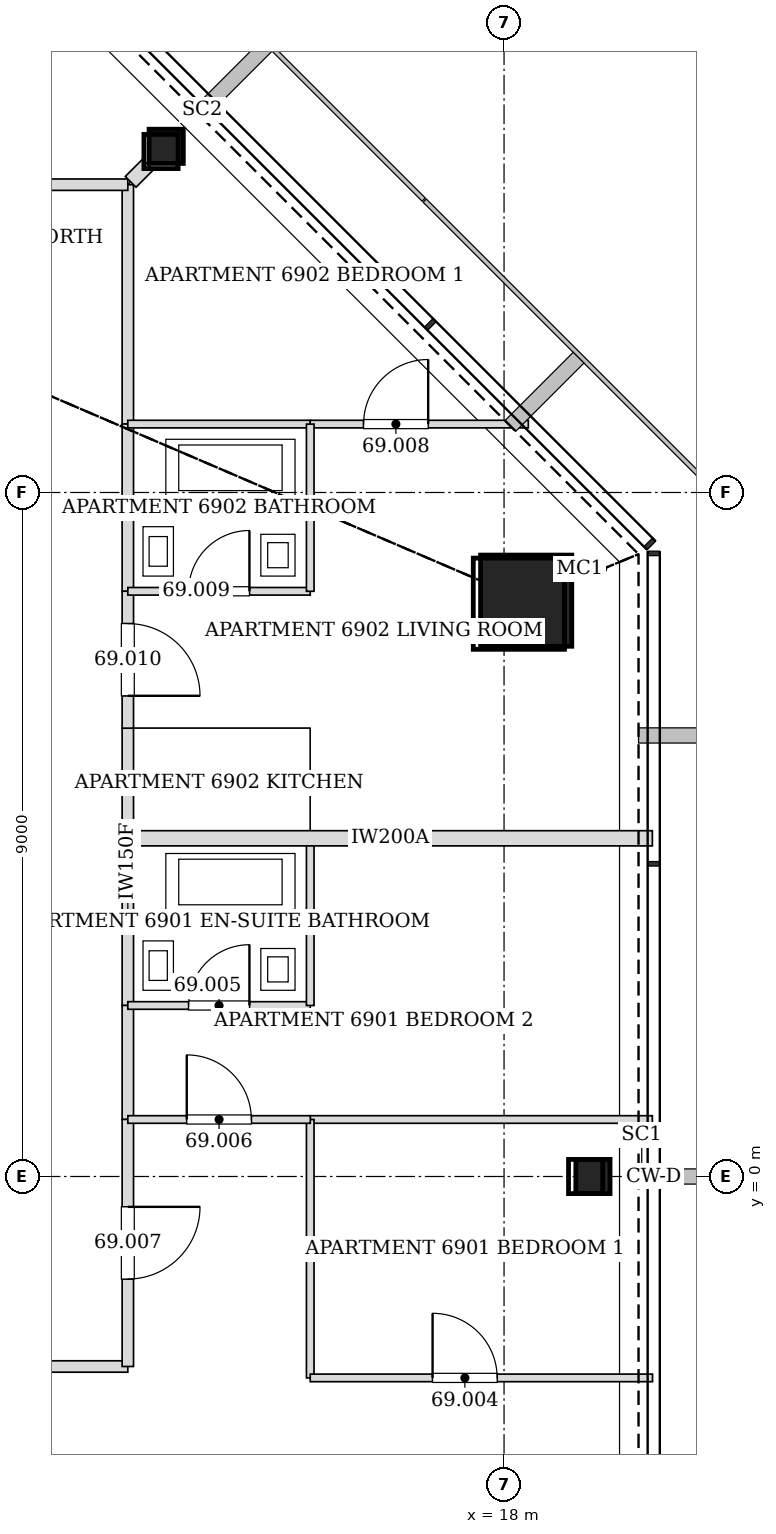
"""IFC4 building model, lengths in metres.
Left out: names, types, materials, properties, quantities, classifications, styles, units other than length and angle.
Written with IfcOpenShell. Run it as: python <this file> out.ifc"""

import sys

from ifc_helpers import new_model, si_unit, direction, frame, frame_2d, origin, origin_2d, place, context, subcontext, project, spatial, rectangle, hollow_rectangle, extrude, element, fill, save


model = new_model("IFC4")
c1 = context("Model", 3, precision=1e-05, world=origin(), true_north=direction((0.0, 1.0)))
c2 = subcontext(c1, "Body", "Model", "MODEL_VIEW")
j1 = project(units=[si_unit("LENGTHUNIT", "METRE"), si_unit("PLANEANGLEUNIT", "RADIAN")], contexts=[c1])
p1 = place(None, origin())
s1 = spatial("IfcSite", under=j1, at=p1, CompositionType="ELEMENT")
p2 = place(p1, origin())
s2 = spatial("IfcBuilding", under=s1, at=p2, CompositionType="ELEMENT")
p3 = place(p2, frame((0.0, 0.0, 284.4)))
s3 = spatial("IfcBuildingStorey", under=s2, at=p3, CompositionType="ELEMENT", Elevation=284.4)
p4 = place(p3, frame((18.291, 7.576, 0.0), z_axis=(-0.028277121884, -0.011698403216, 0.999531666202), x_axis=(0.382282742426, -0.924045401938, 0.0)))
e1 = element("IfcColumn", 1, at=p4, inside=s3, PredefinedType="COLUMN", context=c2, shape_type="SweptSolid", body=[
    extrude(hollow_rectangle(XDim=1.2, YDim=1.2, WallThickness=0.055, at=origin_2d()), origin(), (0.0, 0.0, 1.0), 3.402),
])
for number, where, z_axis, x_axis in (
    (2, (19.169, 0.0, 0.0), (-0.028, 0.0, 1.0), (0.0, -1.0, 0.0)),
    (3, (13.555, 13.555, 0.0), (-0.02, -0.02, 1.0), (0.707, -0.707, 0.0)),
):
    element("IfcColumn", number, at=place(p3, frame(where, z_axis=z_axis, x_axis=x_axis)), inside=s3, PredefinedType="COLUMN", context=c2, shape_type="SweptSolid", body=[
        extrude(hollow_rectangle(XDim=0.45, YDim=0.45, WallThickness=0.02, at=origin_2d()), origin(), (0.0, 0.0, 1.0), 3.402),
    ])
p5 = place(p3, frame((13.05, 2.249, 0.0), z_axis=(0.0, 0.0, 1.0), x_axis=(0.0, 1.0, 0.0)))
e4 = element("IfcWall", 4, at=p5, inside=s3, PredefinedType="PARTITIONING", context=c2, shape_type="SweptSolid", body=[
    extrude(rectangle(XDim=2.202, YDim=0.15, at=frame_2d((1.101, 0.0))), origin(), (0.0, 0.0, 1.0), 3.2),
])
p6 = place(p3, frame((13.05, 0.749, 0.0), z_axis=(0.0, 0.0, 1.0), x_axis=(0.0, 1.0, 0.0)))
e5 = element("IfcWall", 5, at=p6, inside=s3, PredefinedType="PARTITIONING", context=c2, shape_type="SweptSolid", body=[
    extrude(rectangle(XDim=1.502, YDim=0.15, at=frame_2d((0.751, 0.0))), origin(), (0.0, 0.0, 1.0), 3.2),
])
p7 = place(p3, frame((11.25, -2.5, 0.0), z_axis=(0.0, 0.0, 1.0), x_axis=(1.0, 0.0, 0.0)))
e6 = element("IfcWall", 6, at=p7, inside=s3, PredefinedType="PARTITIONING", context=c2, shape_type="SweptSolid", body=[
    extrude(rectangle(XDim=1.8, YDim=0.15, at=frame_2d((0.9, 0.0))), origin(), (0.0, 0.0, 1.0), 3.2),
])
p8 = place(p3, frame((13.05, -2.5, 0.0), z_axis=(0.0, 0.0, 1.0), x_axis=(0.0, 1.0, 0.0)))
e7 = element("IfcWall", 7, at=p8, inside=s3, PredefinedType="PARTITIONING", context=c2, shape_type="SweptSolid", body=[
    extrude(rectangle(XDim=3.251, YDim=0.15, at=frame_2d((1.625, 0.0))), origin(), (0.0, 0.0, 1.0), 2.349),
])
p9 = place(p8, frame((1.15, 0.0, 0.0)))
e8 = element("IfcOpeningElement", 8, at=p9, cuts=e7, PredefinedType="OPENING", context=c2, shape_type="SweptSolid", body=[
    extrude(rectangle(XDim=0.95, YDim=2.1, at=frame_2d((0.475, 1.05))), frame((0.0, 0.085, 0.0), z_axis=(0.0, -1.0, 0.0), x_axis=(1.0, 0.0, 0.0)), (0.0, 0.0, 1.0), 0.17),
])
p10 = place(p3, frame((13.05, 9.899, 0.0), z_axis=(0.0, 0.0, 1.0), x_axis=(0.0, 1.0, 0.0)))
e9 = element("IfcWall", 9, at=p10, inside=s3, PredefinedType="PARTITIONING", context=c2, shape_type="SweptSolid", body=[
    extrude(rectangle(XDim=3.151, YDim=0.15, at=frame_2d((1.576, 0.0))), origin(), (0.0, 0.0, 1.0), 2.497),
])
p11 = place(p3, frame((13.05, 7.699, 0.0), z_axis=(0.0, 0.0, 1.0), x_axis=(0.0, 1.0, 0.0)))
e10 = element("IfcWall", 10, at=p11, inside=s3, PredefinedType="PARTITIONING", context=c2, shape_type="SweptSolid", body=[
    extrude(rectangle(XDim=2.202, YDim=0.15, at=frame_2d((1.101, 0.0))), origin(), (0.0, 0.0, 1.0), 2.497),
])
p12 = place(p3, frame((13.05, 4.449, 0.0), z_axis=(0.0, 0.0, 1.0), x_axis=(0.0, 1.0, 0.0)))
e11 = element("IfcWall", 11, at=p12, inside=s3, PredefinedType="PARTITIONING", context=c2, shape_type="SweptSolid", body=[
    extrude(rectangle(XDim=1.452, YDim=0.15, at=frame_2d((0.726, 0.0))), origin(), (0.0, 0.0, 1.0), 3.2),
])
p13 = place(p3, frame((13.05, 5.899, 0.0), z_axis=(0.0, 0.0, 1.0), x_axis=(0.0, 1.0, 0.0)))
e12 = element("IfcWall", 12, at=p13, inside=s3, PredefinedType="PARTITIONING", context=c2, shape_type="SweptSolid", body=[
    extrude(rectangle(XDim=1.802, YDim=0.15, at=frame_2d((0.901, 0.0))), origin(), (0.0, 0.0, 1.0), 3.2),
])
p14 = place(p13, frame((0.426, 0.0, 0.0)))
e13 = element("IfcOpeningElement", 13, at=p14, cuts=e12, PredefinedType="OPENING", context=c2, shape_type="SweptSolid", body=[
    extrude(rectangle(XDim=0.95, YDim=2.1, at=frame_2d((0.475, 1.05))), frame((0.0, 0.085, 0.0), z_axis=(0.0, -1.0, 0.0), x_axis=(1.0, 0.0, 0.0)), (0.0, 0.0, 1.0), 0.17),
])
p15 = place(p3, frame((13.05, 13.05, 0.0), z_axis=(0.0, 0.0, 1.0), x_axis=(-1.0, 0.0, 0.0)))
e14 = element("IfcWall", 14, at=p15, inside=s3, PredefinedType="PARTITIONING", context=c2, shape_type="SweptSolid", body=[
    extrude(rectangle(XDim=4.101, YDim=0.15, at=frame_2d((2.051, 0.0))), origin(), (0.0, 0.0, 1.0), 2.497),
])
p16 = place(p3, frame((19.951, 0.75, 0.0), z_axis=(0.0, 0.0, 1.0), x_axis=(-1.0, 0.0, 0.0)))
e15 = element("IfcWall", 15, at=p16, inside=s3, PredefinedType="PARTITIONING", context=c2, shape_type="SweptSolid", body=[
    extrude(rectangle(XDim=4.501, YDim=0.1, at=frame_2d((2.251, 0.0))), origin(), (0.0, 0.0, 1.0), 2.591),
])
p17 = place(p3, frame((15.45, 0.75, 0.0), z_axis=(0.0, 0.0, 1.0), x_axis=(0.0, -1.0, 0.0)))
e16 = element("IfcWall", 16, at=p17, inside=s3, PredefinedType="PARTITIONING", context=c2, shape_type="SweptSolid", body=[
    extrude(rectangle(XDim=3.4, YDim=0.1, at=frame_2d((1.7, 0.0))), origin(), (0.0, 0.0, 1.0), 2.349),
])
p18 = place(p3, frame((15.45, -2.65, 0.0), z_axis=(0.0, 0.0, 1.0), x_axis=(1.0, 0.0, 0.0)))
e17 = element("IfcWall", 17, at=p18, inside=s3, PredefinedType="PARTITIONING", context=c2, shape_type="SweptSolid", body=[
    extrude(rectangle(XDim=4.503, YDim=0.1, at=frame_2d((2.252, 0.0))), origin(), (0.0, 0.0, 1.0), 2.591),
])
p19 = place(p18, frame((1.61, 0.0, 0.0)))
e18 = element("IfcOpeningElement", 18, at=p19, cuts=e17, PredefinedType="OPENING", context=c2, shape_type="SweptSolid", body=[
    extrude(rectangle(XDim=0.85, YDim=2.1, at=frame_2d((0.425, 1.05))), frame((0.0, 0.06, 0.0), z_axis=(0.0, -1.0, 0.0), x_axis=(1.0, 0.0, 0.0)), (0.0, 0.0, 1.0), 0.12),
])
p20 = place(p3, frame((13.05, 2.25, 0.0), z_axis=(0.0, 0.0, 1.0), x_axis=(1.0, 0.0, 0.0)))
e19 = element("IfcWall", 19, at=p20, inside=s3, PredefinedType="PARTITIONING", context=c2, shape_type="SweptSolid", body=[
    extrude(rectangle(XDim=2.4, YDim=0.1, at=frame_2d((1.2, 0.0))), origin(), (0.0, 0.0, 1.0), 2.591),
])
p21 = place(p20, frame((0.8, 0.0, 0.0)))
e20 = element("IfcOpeningElement", 20, at=p21, cuts=e19, PredefinedType="OPENING", context=c2, shape_type="SweptSolid", body=[
    extrude(rectangle(XDim=0.8, YDim=2.1, at=frame_2d((0.4, 1.05))), frame((0.0, 0.06, 0.0), z_axis=(0.0, -1.0, 0.0), x_axis=(1.0, 0.0, 0.0)), (0.0, 0.0, 1.0), 0.12),
])
p22 = place(p3, frame((15.45, 2.25, 0.0), z_axis=(0.0, 0.0, 1.0), x_axis=(0.0, 1.0, 0.0)))
e21 = element("IfcWall", 21, at=p22, inside=s3, PredefinedType="PARTITIONING", context=c2, shape_type="SweptSolid", body=[
    extrude(rectangle(XDim=2.2, YDim=0.1, at=frame_2d((1.1, 0.0))), origin(), (0.0, 0.0, 1.0), 3.2),
])
p23 = place(p3, frame((13.05, 4.45, 0.0), z_axis=(0.0, 0.0, 1.0), x_axis=(1.0, 0.0, 0.0)))
e22 = element("IfcWall", 22, at=p23, inside=s3, PredefinedType="PARTITIONING", context=c2, shape_type="SweptSolid", body=[
    extrude(rectangle(XDim=6.901, YDim=0.2, at=frame_2d((3.451, 0.0))), origin(), (0.0, 0.0, 1.0), 2.591),
])
p24 = place(p3, frame((13.05, 0.75, 0.0), z_axis=(0.0, 0.0, 1.0), x_axis=(1.0, 0.0, 0.0)))
e23 = element("IfcWall", 23, at=p24, inside=s3, PredefinedType="PARTITIONING", context=c2, shape_type="SweptSolid", body=[
    extrude(rectangle(XDim=2.401, YDim=0.1, at=frame_2d((1.2, 0.0))), origin(), (0.0, 0.0, 1.0), 2.591),
])
p25 = place(p24, frame((0.775, 0.0, 0.0)))
e24 = element("IfcOpeningElement", 24, at=p25, cuts=e23, PredefinedType="OPENING", context=c2, shape_type="SweptSolid", body=[
    extrude(rectangle(XDim=0.85, YDim=2.1, at=frame_2d((0.425, 1.05))), frame((0.0, 0.06, 0.0), z_axis=(0.0, -1.0, 0.0), x_axis=(1.0, 0.0, 0.0)), (0.0, 0.0, 1.0), 0.12),
])
p26 = place(p3, frame((13.05, 9.9, 0.0), z_axis=(0.0, 0.0, 1.0), x_axis=(1.0, 0.0, 0.0)))
e25 = element("IfcWall", 25, at=p26, inside=s3, PredefinedType="PARTITIONING", context=c2, shape_type="SweptSolid", body=[
    extrude(rectangle(XDim=2.401, YDim=0.1, at=frame_2d((1.2, 0.0))), origin(), (0.0, 0.0, 1.0), 2.497),
])
p27 = place(p3, frame((15.449, 9.9, 0.0), z_axis=(0.0, 0.0, 1.0), x_axis=(1.0, 0.0, 0.0)))
e26 = element("IfcWall", 26, at=p27, inside=s3, PredefinedType="PARTITIONING", context=c2, shape_type="SweptSolid", body=[
    extrude(rectangle(XDim=2.87, YDim=0.1, at=frame_2d((1.435, 0.0))), origin(), (0.0, 0.0, 1.0), 2.74),
])
p28 = place(p27, frame((0.703, 0.0, 0.0)))
e27 = element("IfcOpeningElement", 27, at=p28, cuts=e26, PredefinedType="OPENING", context=c2, shape_type="SweptSolid", body=[
    extrude(rectangle(XDim=0.85, YDim=2.1, at=frame_2d((0.425, 1.05))), frame((0.0, 0.06, 0.0), z_axis=(0.0, -1.0, 0.0), x_axis=(1.0, 0.0, 0.0)), (0.0, 0.0, 1.0), 0.12),
])
p29 = place(p3, frame((13.314, 13.314, 0.0), z_axis=(0.0, 0.0, 1.0), x_axis=(-0.707106781187, -0.707106781187, 0.0)))
e28 = element("IfcWall", 28, at=p29, inside=s3, PredefinedType="PARTITIONING", context=c2, shape_type="SweptSolid", body=[
    extrude(rectangle(XDim=0.321, YDim=0.2, at=frame_2d((0.16, 0.0))), origin(), (0.0, 0.0, 1.0), 2.591),
])
p30 = place(p3, frame((13.05, 7.7, 0.0), z_axis=(0.0, 0.0, 1.0), x_axis=(1.0, 0.0, 0.0)))
e29 = element("IfcWall", 29, at=p30, inside=s3, PredefinedType="PARTITIONING", context=c2, shape_type="SweptSolid", body=[
    extrude(rectangle(XDim=2.4, YDim=0.1, at=frame_2d((1.2, 0.0))), origin(), (0.0, 0.0, 1.0), 2.591),
])
p31 = place(p30, frame((0.8, 0.0, 0.0)))
e30 = element("IfcOpeningElement", 30, at=p31, cuts=e29, PredefinedType="OPENING", context=c2, shape_type="SweptSolid", body=[
    extrude(rectangle(XDim=0.8, YDim=2.1, at=frame_2d((0.4, 1.05))), frame((0.0, 0.06, 0.0), z_axis=(0.0, -1.0, 0.0), x_axis=(1.0, 0.0, 0.0)), (0.0, 0.0, 1.0), 0.12),
])
p32 = place(p3, frame((15.45, 7.7, 0.0), z_axis=(0.0, 0.0, 1.0), x_axis=(0.0, 1.0, 0.0)))
e31 = element("IfcWall", 31, at=p32, inside=s3, PredefinedType="PARTITIONING", context=c2, shape_type="SweptSolid", body=[
    extrude(rectangle(XDim=2.2, YDim=0.1, at=frame_2d((1.1, 0.0))), origin(), (0.0, 0.0, 1.0), 2.497),
])
p33 = place(p19, origin())
e32 = element("IfcDoor", 32, at=p33, inside=s3, OperationType="SINGLE_SWING_LEFT", PredefinedType="DOOR", context=c2, shape_type="SweptSolid", body=[
    extrude(rectangle(XDim=0.85, YDim=2.1, at=frame_2d((0.425, 1.05))), frame((0.0, 0.025, 0.0), z_axis=(0.0, -1.0, 0.0), x_axis=(1.0, 0.0, 0.0)), (0.0, 0.0, 1.0), 0.05),
])
fill(e18, e32)
p34 = place(p21, origin())
e33 = element("IfcDoor", 33, at=p34, inside=s3, OperationType="SINGLE_SWING_RIGHT", PredefinedType="DOOR", context=c2, shape_type="SweptSolid", body=[
    extrude(rectangle(XDim=0.8, YDim=2.1, at=frame_2d((0.4, 1.05))), frame((0.0, 0.025, 0.0), z_axis=(0.0, -1.0, 0.0), x_axis=(1.0, 0.0, 0.0)), (0.0, 0.0, 1.0), 0.05),
])
fill(e20, e33)
p35 = place(p25, origin())
e34 = element("IfcDoor", 34, at=p35, inside=s3, OperationType="SINGLE_SWING_LEFT", PredefinedType="DOOR", context=c2, shape_type="SweptSolid", body=[
    extrude(rectangle(XDim=0.85, YDim=2.1, at=frame_2d((0.425, 1.05))), frame((0.0, 0.025, 0.0), z_axis=(0.0, -1.0, 0.0), x_axis=(1.0, 0.0, 0.0)), (0.0, 0.0, 1.0), 0.05),
])
fill(e24, e34)
p36 = place(p9, frame((0.95, 0.0, 0.0), z_axis=(0.0, 0.0, 1.0), x_axis=(-1.0, 0.0, 0.0)))
e35 = element("IfcDoor", 35, at=p36, inside=s3, OperationType="SINGLE_SWING_LEFT", PredefinedType="DOOR", context=c2, shape_type="SweptSolid", body=[
    extrude(rectangle(XDim=0.95, YDim=2.1, at=frame_2d((0.475, 1.05))), frame((0.0, 0.025, 0.0), z_axis=(0.0, -1.0, 0.0), x_axis=(1.0, 0.0, 0.0)), (0.0, 0.0, 1.0), 0.05),
])
fill(e8, e35)
p37 = place(p28, origin())
e36 = element("IfcDoor", 36, at=p37, inside=s3, OperationType="SINGLE_SWING_RIGHT", PredefinedType="DOOR", context=c2, shape_type="SweptSolid", body=[
    extrude(rectangle(XDim=0.85, YDim=2.1, at=frame_2d((0.425, 1.05))), frame((0.0, 0.025, 0.0), z_axis=(0.0, -1.0, 0.0), x_axis=(1.0, 0.0, 0.0)), (0.0, 0.0, 1.0), 0.05),
])
fill(e27, e36)
p38 = place(p31, origin())
e37 = element("IfcDoor", 37, at=p38, inside=s3, OperationType="SINGLE_SWING_RIGHT", PredefinedType="DOOR", context=c2, shape_type="SweptSolid", body=[
    extrude(rectangle(XDim=0.8, YDim=2.1, at=frame_2d((0.4, 1.05))), frame((0.0, 0.025, 0.0), z_axis=(0.0, -1.0, 0.0), x_axis=(1.0, 0.0, 0.0)), (0.0, 0.0, 1.0), 0.05),
])
fill(e30, e37)
p39 = place(p14, frame((0.95, 0.0, 0.0), z_axis=(0.0, 0.0, 1.0), x_axis=(-1.0, 0.0, 0.0)))
e38 = element("IfcDoor", 38, at=p39, inside=s3, OperationType="SINGLE_SWING_RIGHT", PredefinedType="DOOR", context=c2, shape_type="SweptSolid", body=[
    extrude(rectangle(XDim=0.95, YDim=2.1, at=frame_2d((0.475, 1.05))), frame((0.0, 0.025, 0.0), z_axis=(0.0, -1.0, 0.0), x_axis=(1.0, 0.0, 0.0)), (0.0, 0.0, 1.0), 0.05),
])
fill(e13, e38)
save(model, sys.argv[1])
